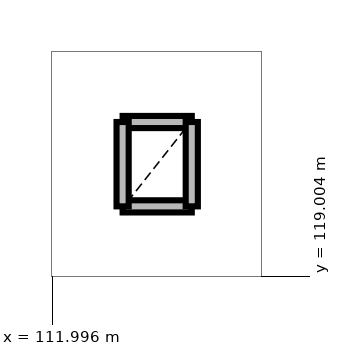
"""IFC4 building model, lengths in metres.
Left out: names, types, materials, properties, quantities, classifications, styles, units other than length and angle.
Written with IfcOpenShell. Run it as: python <this file> out.ifc"""

import sys

from ifc_helpers import new_model, si_unit, direction, frame, frame_2d, origin, place, context, subcontext, project, spatial, rectangle, extrude, element, save


model = new_model("IFC4")
c1 = context("Model", 3, precision=1e-05, world=origin(), true_north=direction((0.0, 1.0)))
c2 = subcontext(c1, "Body", "Model", "MODEL_VIEW")
j1 = project(units=[si_unit("LENGTHUNIT", "METRE"), si_unit("PLANEANGLEUNIT", "RADIAN")], contexts=[c1])
p1 = place(None, origin())
s1 = spatial("IfcSite", under=j1, at=p1, CompositionType="ELEMENT")
p2 = place(p1, origin())
s2 = spatial("IfcBuilding", under=s1, at=p2, CompositionType="ELEMENT")
p3 = place(p2, frame((0.0, 0.0, 5.1)))
s3 = spatial("IfcBuildingStorey", under=s2, at=p3, CompositionType="ELEMENT", Elevation=5.1)
for number, where, z_axis, x_axis in (
    (1, (112.92, 119.92, 0.0), (0.0, 0.0, 1.0), (1.0, 0.0, 0.0)),
    (2, (113.83, 121.03, 0.0), (0.0, 0.0, 1.0), (-1.0, 0.0, 0.0)),
):
    element("IfcWall", number, at=place(p3, frame(where, z_axis=z_axis, x_axis=x_axis)), inside=s3, PredefinedType="PARTITIONING", context=c2, shape_type="SweptSolid", body=[
        extrude(rectangle(XDim=0.91, YDim=0.16, at=frame_2d((0.455, 0.0))), origin(), (0.0, 0.0, 1.0), 3.65),
    ])
for number, where, z_axis, x_axis in (
    (3, (112.92, 121.03, 0.0), (0.0, 0.0, 1.0), (0.0, -1.0, 0.0)),
    (4, (113.83, 119.92, 0.0), (0.0, 0.0, 1.0), (0.0, 1.0, 0.0)),
):
    element("IfcWall", number, at=place(p3, frame(where, z_axis=z_axis, x_axis=x_axis)), inside=s3, PredefinedType="PARTITIONING", context=c2, shape_type="SweptSolid", body=[
        extrude(rectangle(XDim=1.11, YDim=0.16, at=frame_2d((0.555, 0.0))), origin(), (0.0, 0.0, 1.0), 3.65),
    ])
save(model, sys.argv[1])
